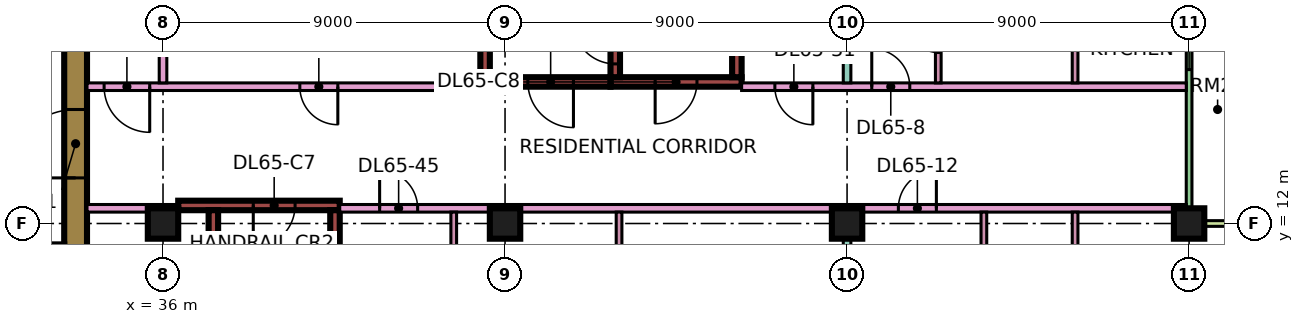
"""IFC4 building model, lengths in metres.
Left out: names, types, materials, properties, quantities, classifications, styles, units other than length and angle.
Written with IfcOpenShell. Run it as: python <this file> out.ifc"""

import sys

from ifc_helpers import new_model, si_unit, direction, frame, frame_2d, origin, origin_2d, place, context, subcontext, project, spatial, rectangle, extrude, element, fill, save


model = new_model("IFC4")
c1 = context("Model", 3, precision=1e-05, world=origin(), true_north=direction((0.0, 1.0)))
c2 = subcontext(c1, "Body", "Model", "MODEL_VIEW")
j1 = project(units=[si_unit("LENGTHUNIT", "METRE"), si_unit("PLANEANGLEUNIT", "RADIAN")], contexts=[c1])
p1 = place(None, origin())
s1 = spatial("IfcSite", under=j1, at=p1, CompositionType="ELEMENT")
p2 = place(p1, origin())
s2 = spatial("IfcBuilding", under=s1, at=p2, CompositionType="ELEMENT")
p3 = place(p2, frame((0.0, 0.0, 280.9)))
s3 = spatial("IfcBuildingStorey", under=s2, at=p3, CompositionType="ELEMENT", Elevation=280.9)
for number, where, z_axis, x_axis in (
    (1, (36.0, 12.0, 0.0), (0.0, 0.0, 1.0), (1.0, 0.0, 0.0)),
    (2, (45.0, 12.0, 0.0), (0.0, 0.0, 1.0), (1.0, 0.0, 0.0)),
    (3, (54.0, 12.0, 0.0), (0.0, 0.0, 1.0), (1.0, 0.0, 0.0)),
    (4, (63.0, 12.0, 0.0), (0.0, 0.0, 1.0), (1.0, 0.0, 0.0)),
):
    element("IfcColumn", number, at=place(p3, frame(where, z_axis=z_axis, x_axis=x_axis)), inside=s3, PredefinedType="COLUMN", context=c2, shape_type="SweptSolid", body=[
        extrude(rectangle(XDim=0.8, YDim=0.8, at=origin_2d()), origin(), (0.0, 0.0, 1.0), 3.75),
    ])
p4 = place(p3, frame((33.7, 7.6, 0.0), z_axis=(0.0, 0.0, 1.0), x_axis=(0.0, 1.0, 0.0)))
e5 = element("IfcWall", 5, at=p4, inside=s3, PredefinedType="SHEAR", context=c2, shape_type="SweptSolid", body=[
    extrude(rectangle(XDim=11.8, YDim=0.6, at=frame_2d((5.9, 0.0))), origin(), (0.0, 0.0, 1.0), 3.75),
])
p5 = place(p4, frame((5.6, 0.0, 0.0)))
e6 = element("IfcOpeningElement", 6, at=p5, cuts=e5, PredefinedType="OPENING", context=c2, shape_type="SweptSolid", body=[
    extrude(rectangle(XDim=1.8, YDim=2.4, at=frame_2d((0.9, 1.2))), frame((0.0, 0.31, 0.0), z_axis=(0.0, -1.0, 0.0), x_axis=(1.0, 0.0, 0.0)), (0.0, 0.0, 1.0), 0.62),
])
p6 = place(p3, frame((36.4, 12.475, 0.0), z_axis=(0.0, 0.0, 1.0), x_axis=(1.0, 0.0, 0.0)))
e7 = element("IfcWall", 7, at=p6, inside=s3, PredefinedType="SHEAR", context=c2, shape_type="SweptSolid", body=[
    extrude(rectangle(XDim=4.25, YDim=0.25, at=frame_2d((2.125, 0.0))), origin(), (0.0, 0.0, 1.0), 3.75),
])
p7 = place(p6, frame((1.975, 0.0, 0.0)))
e8 = element("IfcOpeningElement", 8, at=p7, cuts=e7, PredefinedType="OPENING", context=c2, shape_type="SweptSolid", body=[
    extrude(rectangle(XDim=1.1, YDim=2.2, at=frame_2d((0.55, 1.1))), frame((0.0, 0.135, 0.0), z_axis=(0.0, -1.0, 0.0), x_axis=(1.0, 0.0, 0.0)), (0.0, 0.0, 1.0), 0.27),
])
for number, where, z_axis, x_axis in (
    (9, (37.325, 5.85, 0.0), (0.0, 0.0, 1.0), (0.0, 1.0, 0.0)),
    (10, (40.525, 5.85, 0.0), (0.0, 0.0, 1.0), (0.0, 1.0, 0.0)),
):
    element("IfcWall", number, at=place(p3, frame(where, z_axis=z_axis, x_axis=x_axis)), inside=s3, PredefinedType="SHEAR", context=c2, shape_type="SweptSolid", body=[
        extrude(rectangle(XDim=6.5, YDim=0.25, at=frame_2d((3.25, 0.0))), origin(), (0.0, 0.0, 1.0), 3.75),
    ])
p8 = place(p3, frame((47.775, 15.725, 0.0), z_axis=(0.0, 0.0, 1.0), x_axis=(1.0, 0.0, 0.0)))
e11 = element("IfcWall", 11, at=p8, inside=s3, PredefinedType="SHEAR", context=c2, shape_type="SweptSolid", body=[
    extrude(rectangle(XDim=3.45, YDim=0.25, at=frame_2d((1.725, 0.0))), origin(), (0.0, 0.0, 1.0), 3.75),
])
p9 = place(p8, frame((1.175, 0.0, 0.0)))
e12 = element("IfcOpeningElement", 12, at=p9, cuts=e11, PredefinedType="OPENING", context=c2, shape_type="SweptSolid", body=[
    extrude(rectangle(XDim=1.1, YDim=2.2, at=frame_2d((0.55, 1.1))), frame((0.0, 0.135, 0.0), z_axis=(0.0, -1.0, 0.0), x_axis=(1.0, 0.0, 0.0)), (0.0, 0.0, 1.0), 0.27),
])
p10 = place(p3, frame((47.9, 15.85, 0.0), z_axis=(0.0, 0.0, 1.0), x_axis=(0.0, 1.0, 0.0)))
e13 = element("IfcWall", 13, at=p10, inside=s3, PredefinedType="SHEAR", context=c2, shape_type="SweptSolid", body=[
    extrude(rectangle(XDim=6.5, YDim=0.25, at=frame_2d((3.25, 0.0))), origin(), (0.0, 0.0, 1.0), 3.75),
])
p11 = place(p10, frame((0.35, 0.0, 0.0)))
e14 = element("IfcOpeningElement", 14, at=p11, cuts=e13, PredefinedType="OPENING", context=c2, shape_type="SweptSolid", body=[
    extrude(rectangle(XDim=1.1, YDim=2.2, at=frame_2d((0.55, 1.1))), frame((0.0, 0.135, 0.0), z_axis=(0.0, -1.0, 0.0), x_axis=(1.0, 0.0, 0.0)), (0.0, 0.0, 1.0), 0.27),
])
p12 = place(p3, frame((51.1, 15.85, 0.0), z_axis=(0.0, 0.0, 1.0), x_axis=(0.0, 1.0, 0.0)))
e15 = element("IfcWall", 15, at=p12, inside=s3, PredefinedType="SHEAR", context=c2, shape_type="SweptSolid", body=[
    extrude(rectangle(XDim=6.5, YDim=0.25, at=frame_2d((3.25, 0.0))), origin(), (0.0, 0.0, 1.0), 3.75),
])
p13 = place(p3, frame((44.35, 15.725, 0.0), z_axis=(0.0, 0.0, 1.0), x_axis=(1.0, 0.0, 0.0)))
e16 = element("IfcWall", 16, at=p13, inside=s3, PredefinedType="SHEAR", context=c2, shape_type="SweptSolid", body=[
    extrude(rectangle(XDim=3.425, YDim=0.25, at=frame_2d((1.712, 0.0))), origin(), (0.0, 0.0, 1.0), 3.75),
])
p14 = place(p13, frame((1.25, 0.0, 0.0)))
e17 = element("IfcOpeningElement", 17, at=p14, cuts=e16, PredefinedType="OPENING", context=c2, shape_type="SweptSolid", body=[
    extrude(rectangle(XDim=1.2, YDim=2.2, at=frame_2d((0.6, 1.1))), frame((0.0, 0.135, 0.0), z_axis=(0.0, -1.0, 0.0), x_axis=(1.0, 0.0, 0.0)), (0.0, 0.0, 1.0), 0.27),
])
p15 = place(p3, frame((44.475, 15.85, 0.0), z_axis=(0.0, 0.0, 1.0), x_axis=(0.0, 1.0, 0.0)))
e18 = element("IfcWall", 18, at=p15, inside=s3, PredefinedType="SHEAR", context=c2, shape_type="SweptSolid", body=[
    extrude(rectangle(XDim=6.5, YDim=0.25, at=frame_2d((3.25, 0.0))), origin(), (0.0, 0.0, 1.0), 3.75),
])
p16 = place(p15, frame((1.75, 0.0, 0.0)))
e19 = element("IfcOpeningElement", 19, at=p16, cuts=e18, PredefinedType="OPENING", context=c2, shape_type="SweptSolid", body=[
    extrude(rectangle(XDim=1.1, YDim=2.2, at=frame_2d((0.55, 1.1))), frame((0.0, 0.135, 0.0), z_axis=(0.0, -1.0, 0.0), x_axis=(1.0, 0.0, 0.0)), (0.0, 0.0, 1.0), 0.27),
])
p17 = place(p15, frame((4.3, 0.0, 0.0)))
e20 = element("IfcOpeningElement", 20, at=p17, cuts=e18, PredefinedType="OPENING", context=c2, shape_type="SweptSolid", body=[
    extrude(rectangle(XDim=1.1, YDim=2.2, at=frame_2d((0.55, 1.1))), frame((0.0, 0.135, 0.0), z_axis=(0.0, -1.0, 0.0), x_axis=(1.0, 0.0, 0.0)), (0.0, 0.0, 1.0), 0.27),
])
p18 = place(p3, frame((63.0, 12.075, 0.0), z_axis=(0.0, 0.0, 1.0), x_axis=(0.0, 1.0, 0.0)))
e21 = element("IfcWall", 21, at=p18, inside=s3, PredefinedType="SOLIDWALL", context=c2, shape_type="SweptSolid", body=[
    extrude(rectangle(XDim=10.35, YDim=0.15, at=frame_2d((5.175, 0.0))), origin(), (0.0, 0.0, 1.0), 3.35),
])
p19 = place(p18, frame((3.975, 0.0, 0.45)))
e22 = element("IfcOpeningElement", 22, at=p19, cuts=e21, PredefinedType="OPENING", context=c2, shape_type="SweptSolid", body=[
    extrude(rectangle(XDim=1.8, YDim=2.4, at=frame_2d((0.9, 1.2))), frame((0.0, 0.085, 0.0), z_axis=(0.0, -1.0, 0.0), x_axis=(1.0, 0.0, 0.0)), (0.0, 0.0, 1.0), 0.17),
])
p20 = place(p18, frame((7.988, 0.0, 0.45)))
e23 = element("IfcOpeningElement", 23, at=p20, cuts=e21, PredefinedType="OPENING", context=c2, shape_type="SweptSolid", body=[
    extrude(rectangle(XDim=1.8, YDim=2.4, at=frame_2d((0.9, 1.2))), frame((0.0, 0.085, 0.0), z_axis=(0.0, -1.0, 0.0), x_axis=(1.0, 0.0, 0.0)), (0.0, 0.0, 1.0), 0.17),
])
p21 = place(p3, frame((64.5, 12.0, 0.0), z_axis=(0.0, 0.0, 1.0), x_axis=(-1.0, 0.0, 0.0)))
e24 = element("IfcWall", 24, at=p21, inside=s3, PredefinedType="SOLIDWALL", context=c2, shape_type="SweptSolid", body=[
    extrude(rectangle(XDim=1.5, YDim=0.15, at=frame_2d((0.75, 0.0))), origin(), (0.0, 0.0, 1.0), 3.35),
])
p22 = place(p3, frame((34.0, 12.4, 0.0), z_axis=(0.0, 0.0, 1.0), x_axis=(1.0, 0.0, 0.0)))
e25 = element("IfcWall", 25, at=p22, inside=s3, PredefinedType="PARTITIONING", context=c2, shape_type="SweptSolid", body=[
    extrude(rectangle(XDim=2.401, YDim=0.2, at=frame_2d((1.2, 0.0))), origin(), (0.0, 0.0, 1.0), 3.35),
])
p23 = place(p3, frame((34.0, 15.6, 0.0), z_axis=(0.0, 0.0, 1.0), x_axis=(1.0, 0.0, 0.0)))
e26 = element("IfcWall", 26, at=p23, inside=s3, PredefinedType="PARTITIONING", context=c2, shape_type="SweptSolid", body=[
    extrude(rectangle(XDim=10.35, YDim=0.2, at=frame_2d((5.175, 0.0))), origin(), (0.0, 0.0, 1.0), 3.35),
])
p24 = place(p23, frame((5.6, 0.0, 0.0)))
e27 = element("IfcOpeningElement", 27, at=p24, cuts=e26, PredefinedType="OPENING", context=c2, shape_type="SweptSolid", body=[
    extrude(rectangle(XDim=1.0, YDim=2.1, at=frame_2d((0.5, 1.05))), frame((0.0, 0.11, 0.0), z_axis=(0.0, -1.0, 0.0), x_axis=(1.0, 0.0, 0.0)), (0.0, 0.0, 1.0), 0.22),
])
p25 = place(p23, frame((0.45, 0.0, 0.0)))
e28 = element("IfcOpeningElement", 28, at=p25, cuts=e26, PredefinedType="OPENING", context=c2, shape_type="SweptSolid", body=[
    extrude(rectangle(XDim=1.2, YDim=2.1, at=frame_2d((0.6, 1.05))), frame((0.0, 0.11, 0.0), z_axis=(0.0, -1.0, 0.0), x_axis=(1.0, 0.0, 0.0)), (0.0, 0.0, 1.0), 0.22),
])
p26 = place(p3, frame((36.0, 15.7, 0.0), z_axis=(0.0, 0.0, 1.0), x_axis=(0.0, 1.0, 0.0)))
e29 = element("IfcWall", 29, at=p26, inside=s3, PredefinedType="PARTITIONING", context=c2, shape_type="SweptSolid", body=[
    extrude(rectangle(XDim=8.3, YDim=0.2, at=frame_2d((4.15, 0.0))), origin(), (0.0, 0.0, 1.0), 3.35),
])
p27 = place(p3, frame((40.65, 12.4, 0.0), z_axis=(0.0, 0.0, 1.0), x_axis=(1.0, 0.0, 0.0)))
e30 = element("IfcWall", 30, at=p27, inside=s3, PredefinedType="PARTITIONING", context=c2, shape_type="SweptSolid", body=[
    extrude(rectangle(XDim=22.276, YDim=0.2, at=frame_2d((11.138, 0.0))), origin(), (0.0, 0.0, 1.0), 3.35),
])
p28 = place(p27, frame((14.7, 0.0, 0.0)))
e31 = element("IfcOpeningElement", 31, at=p28, cuts=e30, PredefinedType="OPENING", context=c2, shape_type="SweptSolid", body=[
    extrude(rectangle(XDim=1.0, YDim=2.1, at=frame_2d((0.5, 1.05))), frame((0.0, 0.11, 0.0), z_axis=(0.0, -1.0, 0.0), x_axis=(1.0, 0.0, 0.0)), (0.0, 0.0, 1.0), 0.22),
])
p29 = place(p27, frame((1.05, 0.0, 0.0)))
e32 = element("IfcOpeningElement", 32, at=p29, cuts=e30, PredefinedType="OPENING", context=c2, shape_type="SweptSolid", body=[
    extrude(rectangle(XDim=1.0, YDim=2.1, at=frame_2d((0.5, 1.05))), frame((0.0, 0.11, 0.0), z_axis=(0.0, -1.0, 0.0), x_axis=(1.0, 0.0, 0.0)), (0.0, 0.0, 1.0), 0.22),
])
p30 = place(p3, frame((43.65, 5.975, 0.0), z_axis=(0.0, 0.0, 1.0), x_axis=(0.0, 1.0, 0.0)))
e33 = element("IfcWall", 33, at=p30, inside=s3, PredefinedType="PARTITIONING", context=c2, shape_type="SweptSolid", body=[
    extrude(rectangle(XDim=6.325, YDim=0.15, at=frame_2d((3.163, 0.0))), origin(), (0.0, 0.0, 1.0), 3.35),
])
p31 = place(p30, frame((4.275, 0.0, 0.0)))
e34 = element("IfcOpeningElement", 34, at=p31, cuts=e33, PredefinedType="OPENING", context=c2, shape_type="SweptSolid", body=[
    extrude(rectangle(XDim=0.9, YDim=2.1, at=frame_2d((0.45, 1.05))), frame((0.0, 0.085, 0.0), z_axis=(0.0, -1.0, 0.0), x_axis=(1.0, 0.0, 0.0)), (0.0, 0.0, 1.0), 0.17),
])
p32 = place(p3, frame((48.0, 5.975, 0.0), z_axis=(0.0, 0.0, 1.0), x_axis=(0.0, 1.0, 0.0)))
e35 = element("IfcWall", 35, at=p32, inside=s3, PredefinedType="PARTITIONING", context=c2, shape_type="SweptSolid", body=[
    extrude(rectangle(XDim=6.325, YDim=0.15, at=frame_2d((3.163, 0.0))), origin(), (0.0, 0.0, 1.0), 3.35),
])
p33 = place(p3, frame((51.225, 15.6, 0.0), z_axis=(0.0, 0.0, 1.0), x_axis=(1.0, 0.0, 0.0)))
e36 = element("IfcWall", 36, at=p33, inside=s3, PredefinedType="PARTITIONING", context=c2, shape_type="SweptSolid", body=[
    extrude(rectangle(XDim=11.701, YDim=0.2, at=frame_2d((5.851, 0.0))), origin(), (0.0, 0.0, 1.0), 3.35),
])
p34 = place(p33, frame((3.425, 0.0, 0.0)))
e37 = element("IfcOpeningElement", 37, at=p34, cuts=e36, PredefinedType="OPENING", context=c2, shape_type="SweptSolid", body=[
    extrude(rectangle(XDim=1.0, YDim=2.1, at=frame_2d((0.5, 1.05))), frame((0.0, 0.11, 0.0), z_axis=(0.0, -1.0, 0.0), x_axis=(1.0, 0.0, 0.0)), (0.0, 0.0, 1.0), 0.22),
])
p35 = place(p33, frame((0.875, 0.0, 0.0)))
e38 = element("IfcOpeningElement", 38, at=p35, cuts=e36, PredefinedType="OPENING", context=c2, shape_type="SweptSolid", body=[
    extrude(rectangle(XDim=1.0, YDim=2.1, at=frame_2d((0.5, 1.05))), frame((0.0, 0.11, 0.0), z_axis=(0.0, -1.0, 0.0), x_axis=(1.0, 0.0, 0.0)), (0.0, 0.0, 1.0), 0.22),
])
p36 = place(p3, frame((54.0, 5.825, 0.0), z_axis=(0.0, 0.0, 1.0), x_axis=(0.0, 1.0, 0.0)))
e39 = element("IfcWall", 39, at=p36, inside=s3, PredefinedType="PARTITIONING", context=c2, shape_type="SweptSolid", body=[
    extrude(rectangle(XDim=6.475, YDim=0.2, at=frame_2d((3.238, 0.0))), origin(), (0.0, 0.0, 1.0), 3.35),
])
p37 = place(p3, frame((54.0, 15.7, 0.0), z_axis=(0.0, 0.0, 1.0), x_axis=(0.0, 1.0, 0.0)))
e40 = element("IfcWall", 40, at=p37, inside=s3, PredefinedType="PARTITIONING", context=c2, shape_type="SweptSolid", body=[
    extrude(rectangle(XDim=8.3, YDim=0.2, at=frame_2d((4.15, 0.0))), origin(), (0.0, 0.0, 1.0), 3.35),
])
p38 = place(p3, frame((56.4, 15.7, 0.0), z_axis=(0.0, 0.0, 1.0), x_axis=(0.0, 1.0, 0.0)))
e41 = element("IfcWall", 41, at=p38, inside=s3, PredefinedType="PARTITIONING", context=c2, shape_type="SweptSolid", body=[
    extrude(rectangle(XDim=2.525, YDim=0.15, at=frame_2d((1.263, 0.0))), origin(), (0.0, 0.0, 1.0), 3.35),
])
p39 = place(p38, frame((0.8, 0.0, 0.0)))
e42 = element("IfcOpeningElement", 42, at=p39, cuts=e41, PredefinedType="OPENING", context=c2, shape_type="SweptSolid", body=[
    extrude(rectangle(XDim=0.8, YDim=2.1, at=frame_2d((0.4, 1.05))), frame((0.0, 0.085, 0.0), z_axis=(0.0, -1.0, 0.0), x_axis=(1.0, 0.0, 0.0)), (0.0, 0.0, 1.0), 0.17),
])
p40 = place(p3, frame((57.6, 6.925, 0.0), z_axis=(0.0, 0.0, 1.0), x_axis=(0.0, 1.0, 0.0)))
e43 = element("IfcWall", 43, at=p40, inside=s3, PredefinedType="PARTITIONING", context=c2, shape_type="SweptSolid", body=[
    extrude(rectangle(XDim=5.375, YDim=0.15, at=frame_2d((2.688, 0.0))), origin(), (0.0, 0.0, 1.0), 3.35),
])
p41 = place(p3, frame((60.0, 7.075, 0.0), z_axis=(0.0, 0.0, 1.0), x_axis=(0.0, 1.0, 0.0)))
e44 = element("IfcWall", 44, at=p41, inside=s3, PredefinedType="PARTITIONING", context=c2, shape_type="SweptSolid", body=[
    extrude(rectangle(XDim=5.225, YDim=0.15, at=frame_2d((2.613, 0.0))), origin(), (0.0, 0.0, 1.0), 3.35),
])
p42 = place(p3, frame((60.0, 15.7, 0.0), z_axis=(0.0, 0.0, 1.0), x_axis=(0.0, 1.0, 0.0)))
e45 = element("IfcWall", 45, at=p42, inside=s3, PredefinedType="PARTITIONING", context=c2, shape_type="SweptSolid", body=[
    extrude(rectangle(XDim=2.525, YDim=0.15, at=frame_2d((1.263, 0.0))), origin(), (0.0, 0.0, 1.0), 3.35),
])
p43 = place(p19, origin())
e46 = element("IfcWindow", 46, at=p43, inside=s3, PartitioningType="SINGLE_PANEL", PredefinedType="WINDOW", context=c2, shape_type="SweptSolid", body=[
    extrude(rectangle(XDim=1.8, YDim=2.4, at=frame_2d((0.9, 1.2))), frame((0.0, 0.03, 0.0), z_axis=(0.0, -1.0, 0.0), x_axis=(1.0, 0.0, 0.0)), (0.0, 0.0, 1.0), 0.06),
])
fill(e22, e46)
p44 = place(p5, origin())
e47 = element("IfcDoor", 47, at=p44, inside=s3, OperationType="DOUBLE_DOOR_SINGLE_SWING", PredefinedType="DOOR", context=c2, shape_type="SweptSolid", body=[
    extrude(rectangle(XDim=1.8, YDim=2.4, at=frame_2d((0.9, 1.2))), frame((0.0, 0.025, 0.0), z_axis=(0.0, -1.0, 0.0), x_axis=(1.0, 0.0, 0.0)), (0.0, 0.0, 1.0), 0.05),
])
fill(e6, e47)
p45 = place(p7, frame((1.1, 0.0, 0.0), z_axis=(0.0, 0.0, 1.0), x_axis=(-1.0, 0.0, 0.0)))
e48 = element("IfcDoor", 48, at=p45, inside=s3, OperationType="SINGLE_SWING_LEFT", PredefinedType="DOOR", context=c2, shape_type="SweptSolid", body=[
    extrude(rectangle(XDim=1.1, YDim=2.2, at=frame_2d((0.55, 1.1))), frame((0.0, 0.025, 0.0), z_axis=(0.0, -1.0, 0.0), x_axis=(1.0, 0.0, 0.0)), (0.0, 0.0, 1.0), 0.05),
])
fill(e8, e48)
p46 = place(p9, frame((1.1, 0.0, 0.0), z_axis=(0.0, 0.0, 1.0), x_axis=(-1.0, 0.0, 0.0)))
e49 = element("IfcDoor", 49, at=p46, inside=s3, OperationType="SINGLE_SWING_LEFT", PredefinedType="DOOR", context=c2, shape_type="SweptSolid", body=[
    extrude(rectangle(XDim=1.1, YDim=2.2, at=frame_2d((0.55, 1.1))), frame((0.0, 0.025, 0.0), z_axis=(0.0, -1.0, 0.0), x_axis=(1.0, 0.0, 0.0)), (0.0, 0.0, 1.0), 0.05),
])
fill(e12, e49)
p47 = place(p14, origin())
e50 = element("IfcDoor", 50, at=p47, inside=s3, OperationType="SINGLE_SWING_RIGHT", PredefinedType="DOOR", context=c2, shape_type="SweptSolid", body=[
    extrude(rectangle(XDim=1.2, YDim=2.2, at=frame_2d((0.6, 1.1))), frame((0.0, 0.025, 0.0), z_axis=(0.0, -1.0, 0.0), x_axis=(1.0, 0.0, 0.0)), (0.0, 0.0, 1.0), 0.05),
])
fill(e17, e50)
p48 = place(p11, frame((1.1, 0.0, 0.0), z_axis=(0.0, 0.0, 1.0), x_axis=(-1.0, 0.0, 0.0)))
e51 = element("IfcDoor", 51, at=p48, inside=s3, OperationType="SINGLE_SWING_RIGHT", PredefinedType="DOOR", context=c2, shape_type="SweptSolid", body=[
    extrude(rectangle(XDim=1.1, YDim=2.2, at=frame_2d((0.55, 1.1))), frame((0.0, 0.025, 0.0), z_axis=(0.0, -1.0, 0.0), x_axis=(1.0, 0.0, 0.0)), (0.0, 0.0, 1.0), 0.05),
])
fill(e14, e51)
p49 = place(p24, origin())
e52 = element("IfcDoor", 52, at=p49, inside=s3, OperationType="SINGLE_SWING_RIGHT", PredefinedType="DOOR", context=c2, shape_type="SweptSolid", body=[
    extrude(rectangle(XDim=1.0, YDim=2.1, at=frame_2d((0.5, 1.05))), frame((0.0, 0.025, 0.0), z_axis=(0.0, -1.0, 0.0), x_axis=(1.0, 0.0, 0.0)), (0.0, 0.0, 1.0), 0.05),
])
fill(e27, e52)
p50 = place(p39, frame((0.8, 0.0, 0.0), z_axis=(0.0, 0.0, 1.0), x_axis=(-1.0, 0.0, 0.0)))
e53 = element("IfcDoor", 53, at=p50, inside=s3, OperationType="SINGLE_SWING_RIGHT", PredefinedType="DOOR", context=c2, shape_type="SweptSolid", body=[
    extrude(rectangle(XDim=0.8, YDim=2.1, at=frame_2d((0.4, 1.05))), frame((0.0, 0.025, 0.0), z_axis=(0.0, -1.0, 0.0), x_axis=(1.0, 0.0, 0.0)), (0.0, 0.0, 1.0), 0.05),
])
fill(e42, e53)
p51 = place(p34, origin())
e54 = element("IfcDoor", 54, at=p51, inside=s3, OperationType="SINGLE_SWING_LEFT", PredefinedType="DOOR", context=c2, shape_type="SweptSolid", body=[
    extrude(rectangle(XDim=1.0, YDim=2.1, at=frame_2d((0.5, 1.05))), frame((0.0, 0.025, 0.0), z_axis=(0.0, -1.0, 0.0), x_axis=(1.0, 0.0, 0.0)), (0.0, 0.0, 1.0), 0.05),
])
fill(e37, e54)
p52 = place(p28, frame((1.0, 0.0, 0.0), z_axis=(0.0, 0.0, 1.0), x_axis=(-1.0, 0.0, 0.0)))
e55 = element("IfcDoor", 55, at=p52, inside=s3, OperationType="SINGLE_SWING_RIGHT", PredefinedType="DOOR", context=c2, shape_type="SweptSolid", body=[
    extrude(rectangle(XDim=1.0, YDim=2.1, at=frame_2d((0.5, 1.05))), frame((0.0, 0.025, 0.0), z_axis=(0.0, -1.0, 0.0), x_axis=(1.0, 0.0, 0.0)), (0.0, 0.0, 1.0), 0.05),
])
fill(e31, e55)
p53 = place(p25, origin())
e56 = element("IfcDoor", 56, at=p53, inside=s3, OperationType="SINGLE_SWING_RIGHT", PredefinedType="DOOR", context=c2, shape_type="SweptSolid", body=[
    extrude(rectangle(XDim=1.2, YDim=2.1, at=frame_2d((0.6, 1.05))), frame((0.0, 0.025, 0.0), z_axis=(0.0, -1.0, 0.0), x_axis=(1.0, 0.0, 0.0)), (0.0, 0.0, 1.0), 0.05),
])
fill(e28, e56)
p54 = place(p35, origin())
e57 = element("IfcDoor", 57, at=p54, inside=s3, OperationType="SINGLE_SWING_RIGHT", PredefinedType="DOOR", context=c2, shape_type="SweptSolid", body=[
    extrude(rectangle(XDim=1.0, YDim=2.1, at=frame_2d((0.5, 1.05))), frame((0.0, 0.025, 0.0), z_axis=(0.0, -1.0, 0.0), x_axis=(1.0, 0.0, 0.0)), (0.0, 0.0, 1.0), 0.05),
])
fill(e38, e57)
p55 = place(p29, origin())
e58 = element("IfcDoor", 58, at=p55, inside=s3, OperationType="SINGLE_SWING_LEFT", PredefinedType="DOOR", context=c2, shape_type="SweptSolid", body=[
    extrude(rectangle(XDim=1.0, YDim=2.1, at=frame_2d((0.5, 1.05))), frame((0.0, 0.025, 0.0), z_axis=(0.0, -1.0, 0.0), x_axis=(1.0, 0.0, 0.0)), (0.0, 0.0, 1.0), 0.05),
])
fill(e32, e58)
save(model, sys.argv[1])
